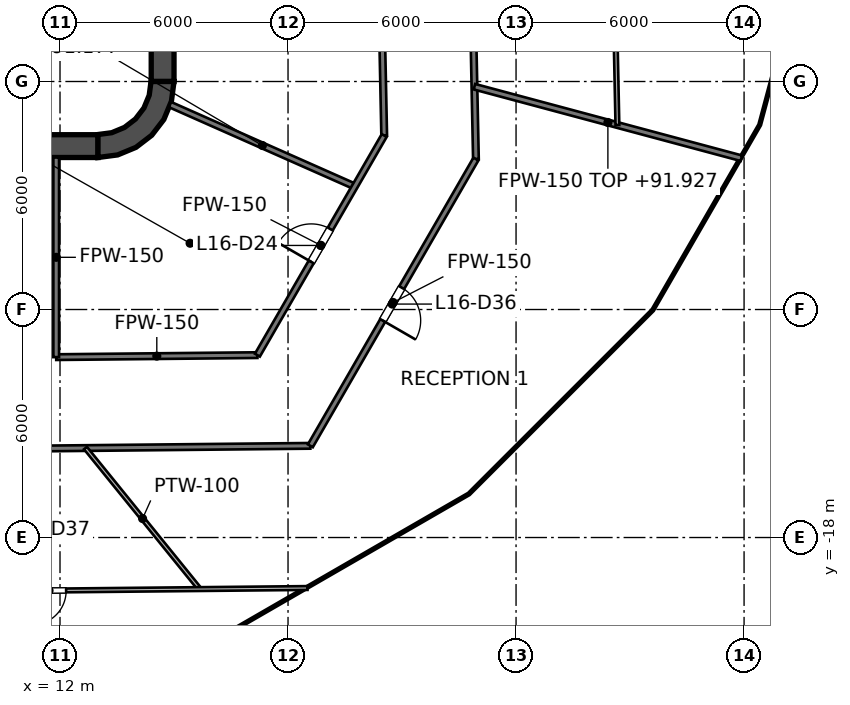
"""IFC4 building model, lengths in metres.
Left out: names, types, materials, properties, quantities, classifications, styles, units other than length and angle.
Written with IfcOpenShell. Run it as: python <this file> out.ifc"""

import sys

from ifc_helpers import new_model, si_unit, direction, frame, frame_2d, origin, place, context, subcontext, project, spatial, polyline, rectangle, outline, extrude, element, fill, save


model = new_model("IFC4")
c1 = context("Model", 3, precision=1e-05, world=origin(), true_north=direction((0.0, 1.0)))
c2 = subcontext(c1, "Body", "Model", "MODEL_VIEW")
j1 = project(units=[si_unit("LENGTHUNIT", "METRE"), si_unit("PLANEANGLEUNIT", "RADIAN")], contexts=[c1])
p1 = place(None, origin())
s1 = spatial("IfcSite", under=j1, at=p1, CompositionType="ELEMENT")
p2 = place(p1, origin())
s2 = spatial("IfcBuilding", under=s1, at=p2, CompositionType="ELEMENT")
p3 = place(p2, frame((0.0, 0.0, 88.2)))
s3 = spatial("IfcBuildingStorey", under=s2, at=p3, CompositionType="ELEMENT", Elevation=88.2)
p4 = place(p3, frame((-13.0, -7.7, 0.0), z_axis=(0.0, 0.0, 1.0), x_axis=(1.0, 0.0, 0.0)))
e1 = element("IfcWall", 1, at=p4, inside=s3, PredefinedType="SHEAR", context=c2, shape_type="SweptSolid", body=[
    extrude(rectangle(XDim=26.0, YDim=0.6, at=frame_2d((13.0, 0.0))), origin(), (0.0, 0.0, 1.0), 4.2),
])
p5 = place(p4, frame((1.7, 0.0, 0.0)))
e2 = element("IfcOpeningElement", 2, at=p5, cuts=e1, PredefinedType="OPENING", context=c2, shape_type="SweptSolid", body=[
    extrude(rectangle(XDim=1.8, YDim=2.1, at=frame_2d((0.9, 1.05))), frame((0.0, 0.3, 0.0), z_axis=(0.0, -1.0, 0.0), x_axis=(1.0, 0.0, 0.0)), (0.0, 0.0, 1.0), 0.6),
])
p6 = place(p4, frame((22.5, 0.0, 0.0)))
e3 = element("IfcOpeningElement", 3, at=p6, cuts=e1, PredefinedType="OPENING", context=c2, shape_type="SweptSolid", body=[
    extrude(rectangle(XDim=1.8, YDim=2.1, at=frame_2d((0.9, 1.05))), frame((0.0, 0.3, 0.0), z_axis=(0.0, -1.0, 0.0), x_axis=(1.0, 0.0, 0.0)), (0.0, 0.0, 1.0), 0.6),
])
p7 = place(p3, frame((14.7, -6.0, 0.0), z_axis=(0.0, 0.0, 1.0), x_axis=(0.0, 1.0, 0.0)))
e4 = element("IfcWall", 4, at=p7, inside=s3, PredefinedType="SHEAR", context=c2, shape_type="SweptSolid", body=[
    extrude(rectangle(XDim=12.0, YDim=0.6, at=frame_2d((6.0, 0.0))), origin(), (0.0, 0.0, 1.0), 4.2),
])
p8 = place(p3, origin())
e5 = element("IfcWall", 5, at=p8, inside=s3, PredefinedType="SHEAR", context=c2, shape_type="SweptSolid", body=[
    extrude(outline(polyline([(15.0, -6.0), (14.395, -6.0), (14.347, -6.361), (14.208, -6.698), (13.986, -6.986), (13.698, -7.208), (13.361, -7.347), (13.0, -7.395), (13.0, -8.0), (13.518, -7.932), (14.0, -7.732), (14.414, -7.414), (14.732, -7.0), (14.932, -6.518), (15.0, -6.0)])), origin(), (0.0, 0.0, 1.0), 4.2),
])
p9 = place(p3, frame((11.8, -7.4, 0.0), z_axis=(0.0, 0.0, 1.0), x_axis=(0.0, 1.0, 0.0)))
e6 = element("IfcWall", 6, at=p9, inside=s3, PredefinedType="SOLIDWALL", context=c2, shape_type="SweptSolid", body=[
    extrude(rectangle(XDim=14.8, YDim=0.4, at=frame_2d((7.4, 0.0))), origin(), (0.0, 0.0, 1.0), 4.05),
])
p10 = place(p9, frame((11.2, 0.0, 0.0)))
e7 = element("IfcOpeningElement", 7, at=p10, cuts=e6, PredefinedType="OPENING", context=c2, shape_type="SweptSolid", body=[
    extrude(rectangle(XDim=1.1, YDim=2.1, at=frame_2d((0.55, 1.05))), frame((0.0, 0.2, 0.0), z_axis=(0.0, -1.0, 0.0), x_axis=(1.0, 0.0, 0.0)), (0.0, 0.0, 1.0), 0.4),
])
p11 = place(p9, frame((8.3, 0.0, 0.0)))
e8 = element("IfcOpeningElement", 8, at=p11, cuts=e6, PredefinedType="OPENING", context=c2, shape_type="SweptSolid", body=[
    extrude(rectangle(XDim=1.1, YDim=2.1, at=frame_2d((0.55, 1.05))), frame((0.0, 0.2, 0.0), z_axis=(0.0, -1.0, 0.0), x_axis=(1.0, 0.0, 0.0)), (0.0, 0.0, 1.0), 0.4),
])
p12 = place(p9, frame((5.4, 0.0, 0.0)))
e9 = element("IfcOpeningElement", 9, at=p12, cuts=e6, PredefinedType="OPENING", context=c2, shape_type="SweptSolid", body=[
    extrude(rectangle(XDim=1.1, YDim=2.1, at=frame_2d((0.55, 1.05))), frame((0.0, 0.2, 0.0), z_axis=(0.0, -1.0, 0.0), x_axis=(1.0, 0.0, 0.0)), (0.0, 0.0, 1.0), 0.4),
])
p13 = place(p9, frame((13.552, 0.0, 0.0)))
e10 = element("IfcOpeningElement", 10, at=p13, cuts=e6, PredefinedType="OPENING", context=c2, shape_type="SweptSolid", body=[
    extrude(rectangle(XDim=0.9, YDim=2.1, at=frame_2d((0.45, 1.05))), frame((0.0, 0.2, 0.0), z_axis=(0.0, -1.0, 0.0), x_axis=(1.0, 0.0, 0.0)), (0.0, 0.0, 1.0), 0.4),
])
p14 = place(p9, frame((0.347, 0.0, 0.0)))
e11 = element("IfcOpeningElement", 11, at=p14, cuts=e6, PredefinedType="OPENING", context=c2, shape_type="SweptSolid", body=[
    extrude(rectangle(XDim=0.9, YDim=2.1, at=frame_2d((0.45, 1.05))), frame((0.0, 0.2, 0.0), z_axis=(0.0, -1.0, 0.0), x_axis=(1.0, 0.0, 0.0)), (0.0, 0.0, 1.0), 0.4),
])
e12 = element("IfcWall", 12, at=p8, inside=s3, PredefinedType="SOLIDWALL", context=c2, shape_type="SweptSolid", body=[
    extrude(outline(polyline([(12.0, -5.675), (12.0, -5.925), (14.15, -5.925), (14.4, -5.925), (14.4, -5.675), (14.4, -3.025), (14.4, -2.775), (14.4, -0.125), (14.4, 0.125), (14.4, 2.775), (14.4, 3.025), (14.4, 5.675), (14.4, 5.925), (14.15, 5.925), (12.0, 5.925), (12.0, 5.675), (14.15, 5.675), (14.15, 3.025), (12.0, 3.025), (12.0, 2.775), (14.15, 2.775), (14.15, 0.125), (12.0, 0.125), (12.0, -0.125), (14.15, -0.125), (14.15, -2.775), (12.0, -2.775), (12.0, -3.025), (14.15, -3.025), (14.15, -5.675), (12.0, -5.675)])), origin(), (0.0, 0.0, 1.0), 4.05),
])
p15 = place(p3, frame((20.167, 10.213, 0.0), z_axis=(0.0, 0.0, 1.0), x_axis=(0.020610894613, -0.999787572949, 0.0)))
e13 = element("IfcWall", 13, at=p15, inside=s3, PredefinedType="PARTITIONING", context=c2, shape_type="SweptSolid", body=[
    extrude(rectangle(XDim=17.637, YDim=0.15, at=frame_2d((8.819, 0.0))), origin(), (0.0, 0.0, 1.0), 2.968),
])
p16 = place(p15, frame((10.508, 0.0, 0.0)))
e14 = element("IfcOpeningElement", 14, at=p16, cuts=e13, PredefinedType="OPENING", context=c2, shape_type="SweptSolid", body=[
    extrude(rectangle(XDim=1.0, YDim=2.1, at=frame_2d((0.5, 1.05))), frame((0.0, 0.075, 0.0), z_axis=(0.0, -1.0, 0.0), x_axis=(1.0, 0.0, 0.0)), (0.0, 0.0, 1.0), 0.15),
])
p17 = place(p15, frame((5.09, 0.0, 0.0)))
e15 = element("IfcOpeningElement", 15, at=p17, cuts=e13, PredefinedType="OPENING", context=c2, shape_type="SweptSolid", body=[
    extrude(rectangle(XDim=1.0, YDim=2.1, at=frame_2d((0.5, 1.05))), frame((0.0, 0.075, 0.0), z_axis=(0.0, -1.0, 0.0), x_axis=(1.0, 0.0, 0.0)), (0.0, 0.0, 1.0), 0.15),
])
p18 = place(p3, frame((22.539, 11.615, 0.0), z_axis=(0.0, 0.0, 1.0), x_axis=(0.020601506683, -0.99978776644, 0.0)))
e16 = element("IfcWall", 16, at=p18, inside=s3, PredefinedType="PARTITIONING", context=c2, shape_type="SweptSolid", body=[
    extrude(rectangle(XDim=19.66, YDim=0.15, at=frame_2d((9.83, 0.0))), origin(), (0.0, 0.0, 1.0), 2.968),
])
p19 = place(p18, frame((13.54, 0.0, 0.0)))
e17 = element("IfcOpeningElement", 17, at=p19, cuts=e16, PredefinedType="OPENING", context=c2, shape_type="SweptSolid", body=[
    extrude(rectangle(XDim=1.0, YDim=2.1, at=frame_2d((0.5, 1.05))), frame((0.0, 0.075, 0.0), z_axis=(0.0, -1.0, 0.0), x_axis=(1.0, 0.0, 0.0)), (0.0, 0.0, 1.0), 0.15),
])
p20 = place(p18, frame((9.23, 0.0, 0.0)))
e18 = element("IfcOpeningElement", 18, at=p20, cuts=e16, PredefinedType="OPENING", context=c2, shape_type="SweptSolid", body=[
    extrude(rectangle(XDim=1.0, YDim=2.1, at=frame_2d((0.5, 1.05))), frame((0.0, 0.075, 0.0), z_axis=(0.0, -1.0, 0.0), x_axis=(1.0, 0.0, 0.0)), (0.0, 0.0, 1.0), 0.15),
])
p21 = place(p3, frame((14.895, -6.607, 0.0), z_axis=(0.0, 0.0, 1.0), x_axis=(0.914233271379, -0.405188259337, 0.0)))
e19 = element("IfcWall", 19, at=p21, inside=s3, PredefinedType="PARTITIONING", context=c2, shape_type="SweptSolid", body=[
    extrude(rectangle(XDim=5.317, YDim=0.15, at=frame_2d((2.659, 0.0))), origin(), (0.0, 0.0, 1.0), 2.977),
])
p22 = place(p3, frame((22.905, -6.137, 0.0), z_axis=(0.0, 0.0, 1.0), x_axis=(0.965915974273, -0.258855810529, 0.0)))
e20 = element("IfcWall", 20, at=p22, inside=s3, PredefinedType="PARTITIONING", context=c2, shape_type="SweptSolid", body=[
    extrude(rectangle(XDim=7.271, YDim=0.15, at=frame_2d((3.635, 0.0))), origin(), (0.0, 0.0, 1.0), 3.727),
])
p23 = place(p3, frame((-14.534, -15.916, 0.0), z_axis=(0.0, 0.0, 1.0), x_axis=(0.999950930262, 0.009906415532, 0.0)))
e21 = element("IfcWall", 21, at=p23, inside=s3, PredefinedType="PARTITIONING", context=c2, shape_type="SweptSolid", body=[
    extrude(rectangle(XDim=33.123, YDim=0.15, at=frame_2d((16.561, 0.0))), origin(), (0.0, 0.0, 1.0), 2.968),
])
p24 = place(p23, frame((22.477, 0.0, 0.0)))
e22 = element("IfcOpeningElement", 22, at=p24, cuts=e21, PredefinedType="OPENING", context=c2, shape_type="SweptSolid", body=[
    extrude(rectangle(XDim=1.0, YDim=2.1, at=frame_2d((0.5, 1.05))), frame((0.0, 0.075, 0.0), z_axis=(0.0, -1.0, 0.0), x_axis=(1.0, 0.0, 0.0)), (0.0, 0.0, 1.0), 0.15),
])
p25 = place(p23, frame((7.723, 0.0, 0.0)))
e23 = element("IfcOpeningElement", 23, at=p25, cuts=e21, PredefinedType="OPENING", context=c2, shape_type="SweptSolid", body=[
    extrude(rectangle(XDim=1.0, YDim=2.1, at=frame_2d((0.5, 1.05))), frame((0.0, 0.075, 0.0), z_axis=(0.0, -1.0, 0.0), x_axis=(1.0, 0.0, 0.0)), (0.0, 0.0, 1.0), 0.15),
])
p26 = place(p23, frame((16.111, 0.0, 0.0)))
e24 = element("IfcOpeningElement", 24, at=p26, cuts=e21, PredefinedType="OPENING", context=c2, shape_type="SweptSolid", body=[
    extrude(rectangle(XDim=1.0, YDim=2.1, at=frame_2d((0.5, 1.05))), frame((0.0, 0.075, 0.0), z_axis=(0.0, -1.0, 0.0), x_axis=(1.0, 0.0, 0.0)), (0.0, 0.0, 1.0), 0.15),
])
p27 = place(p3, frame((11.9, -13.253, 0.0), z_axis=(0.0, 0.0, 1.0), x_axis=(0.999950853109, 0.009914200296, 0.0)))
e25 = element("IfcWall", 25, at=p27, inside=s3, PredefinedType="PARTITIONING", context=c2, shape_type="SweptSolid", body=[
    extrude(rectangle(XDim=5.294, YDim=0.15, at=frame_2d((2.647, 0.0))), origin(), (0.0, 0.0, 1.0), 2.968),
])
p28 = place(p3, frame((18.587, -15.587, 0.0), z_axis=(0.0, 0.0, 1.0), x_axis=(0.500026433136, 0.866010142069, 0.0)))
e26 = element("IfcWall", 26, at=p28, inside=s3, PredefinedType="PARTITIONING", context=c2, shape_type="SweptSolid", body=[
    extrude(rectangle(XDim=8.713, YDim=0.15, at=frame_2d((4.357, 0.0))), origin(), (0.0, 0.0, 1.0), 2.968),
])
p29 = place(p28, frame((3.807, 0.0, 0.0)))
e27 = element("IfcOpeningElement", 27, at=p29, cuts=e26, PredefinedType="OPENING", context=c2, shape_type="SweptSolid", body=[
    extrude(rectangle(XDim=1.0, YDim=2.1, at=frame_2d((0.5, 1.05))), frame((0.0, 0.075, 0.0), z_axis=(0.0, -1.0, 0.0), x_axis=(1.0, 0.0, 0.0)), (0.0, 0.0, 1.0), 0.15),
])
p30 = place(p3, frame((17.194, -13.201, 0.0), z_axis=(0.0, 0.0, 1.0), x_axis=(0.50001062018, 0.866019272134, 0.0)))
e28 = element("IfcWall", 28, at=p30, inside=s3, PredefinedType="PARTITIONING", context=c2, shape_type="SweptSolid", body=[
    extrude(rectangle(XDim=6.674, YDim=0.15, at=frame_2d((3.337, 0.0))), origin(), (0.0, 0.0, 1.0), 2.968),
])
p31 = place(p30, frame((2.833, 0.0, 0.0)))
e29 = element("IfcOpeningElement", 29, at=p31, cuts=e28, PredefinedType="OPENING", context=c2, shape_type="SweptSolid", body=[
    extrude(rectangle(XDim=1.0, YDim=2.1, at=frame_2d((0.5, 1.05))), frame((0.0, 0.075, 0.0), z_axis=(0.0, -1.0, 0.0), x_axis=(1.0, 0.0, 0.0)), (0.0, 0.0, 1.0), 0.15),
])
p32 = place(p3, frame((11.9, -13.253, 0.0), z_axis=(0.0, 0.0, 1.0), x_axis=(0.0, 1.0, 0.0)))
e30 = element("IfcWall", 30, at=p32, inside=s3, PredefinedType="PARTITIONING", context=c2, shape_type="SweptSolid", body=[
    extrude(rectangle(XDim=5.253, YDim=0.15, at=frame_2d((2.626, 0.0))), origin(), (0.0, 0.0, 1.0), 2.968),
])
p33 = place(p3, frame((26.243, 13.397, 0.0), z_axis=(0.0, 0.0, 1.0), x_axis=(0.020639766813, -0.999786977324, 0.0)))
e31 = element("IfcWall", 31, at=p33, inside=s3, PredefinedType="PARTITIONING", context=c2, shape_type="SweptSolid", body=[
    extrude(rectangle(XDim=20.546, YDim=0.1, at=frame_2d((10.273, 0.0))), origin(), (0.0, 0.0, 1.0), 2.968),
])
p34 = place(p33, frame((5.506, 0.0, 0.0)))
e32 = element("IfcOpeningElement", 32, at=p34, cuts=e31, PredefinedType="OPENING", context=c2, shape_type="SweptSolid", body=[
    extrude(rectangle(XDim=0.9, YDim=2.1, at=frame_2d((0.45, 1.05))), frame((0.0, 0.05, 0.0), z_axis=(0.0, -1.0, 0.0), x_axis=(1.0, 0.0, 0.0)), (0.0, 0.0, 1.0), 0.1),
])
p35 = place(p3, frame((12.67, -15.646, 0.0), z_axis=(0.0, 0.0, 1.0), x_axis=(0.629429152062, -0.777057875923, 0.0)))
e33 = element("IfcWall", 33, at=p35, inside=s3, PredefinedType="PARTITIONING", context=c2, shape_type="SweptSolid", body=[
    extrude(rectangle(XDim=4.774, YDim=0.1, at=frame_2d((2.387, 0.0))), origin(), (0.0, 0.0, 1.0), 3.9),
])
p36 = place(p3, frame((-15.26, -19.663, 0.0), z_axis=(0.0, 0.0, 1.0), x_axis=(0.999951032014, 0.009896139397, 0.0)))
e34 = element("IfcWall", 34, at=p36, inside=s3, PredefinedType="PARTITIONING", context=c2, shape_type="SweptSolid", body=[
    extrude(rectangle(XDim=33.774, YDim=0.1, at=frame_2d((16.887, 0.0))), origin(), (0.0, 0.0, 1.0), 2.968),
])
p37 = place(p36, frame((26.523, 0.0, 0.0)))
e35 = element("IfcOpeningElement", 35, at=p37, cuts=e34, PredefinedType="OPENING", context=c2, shape_type="SweptSolid", body=[
    extrude(rectangle(XDim=0.9, YDim=2.1, at=frame_2d((0.45, 1.05))), frame((0.0, 0.05, 0.0), z_axis=(0.0, -1.0, 0.0), x_axis=(1.0, 0.0, 0.0)), (0.0, 0.0, 1.0), 0.1),
])
p38 = place(p36, frame((2.43, 0.0, 0.0)))
e36 = element("IfcOpeningElement", 36, at=p38, cuts=e34, PredefinedType="OPENING", context=c2, shape_type="SweptSolid", body=[
    extrude(rectangle(XDim=0.9, YDim=2.1, at=frame_2d((0.45, 1.05))), frame((0.0, 0.05, 0.0), z_axis=(0.0, -1.0, 0.0), x_axis=(1.0, 0.0, 0.0)), (0.0, 0.0, 1.0), 0.1),
])
p39 = place(p36, frame((15.34, 0.0, 0.0)))
e37 = element("IfcOpeningElement", 37, at=p39, cuts=e34, PredefinedType="OPENING", context=c2, shape_type="SweptSolid", body=[
    extrude(rectangle(XDim=0.9, YDim=2.1, at=frame_2d((0.45, 1.05))), frame((0.0, 0.05, 0.0), z_axis=(0.0, -1.0, 0.0), x_axis=(1.0, 0.0, 0.0)), (0.0, 0.0, 1.0), 0.1),
])
p40 = place(p14, origin())
e38 = element("IfcDoor", 38, at=p40, inside=s3, OperationType="SINGLE_SWING_RIGHT", PredefinedType="DOOR", context=c2, shape_type="SweptSolid", body=[
    extrude(rectangle(XDim=0.9, YDim=2.1, at=frame_2d((0.45, 1.05))), frame((0.0, 0.025, 0.0), z_axis=(0.0, -1.0, 0.0), x_axis=(1.0, 0.0, 0.0)), (0.0, 0.0, 1.0), 0.05),
])
fill(e11, e38)
p41 = place(p31, origin())
e39 = element("IfcDoor", 39, at=p41, inside=s3, OperationType="SINGLE_SWING_LEFT", PredefinedType="DOOR", context=c2, shape_type="SweptSolid", body=[
    extrude(rectangle(XDim=1.0, YDim=2.1, at=frame_2d((0.5, 1.05))), frame((0.0, 0.025, 0.0), z_axis=(0.0, -1.0, 0.0), x_axis=(1.0, 0.0, 0.0)), (0.0, 0.0, 1.0), 0.05),
])
fill(e29, e39)
p42 = place(p29, origin())
e40 = element("IfcDoor", 40, at=p42, inside=s3, OperationType="SINGLE_SWING_LEFT", PredefinedType="DOOR", context=c2, shape_type="SweptSolid", body=[
    extrude(rectangle(XDim=1.0, YDim=2.1, at=frame_2d((0.5, 1.05))), frame((0.0, 0.025, 0.0), z_axis=(0.0, -1.0, 0.0), x_axis=(1.0, 0.0, 0.0)), (0.0, 0.0, 1.0), 0.05),
])
fill(e27, e40)
p43 = place(p37, origin())
e41 = element("IfcDoor", 41, at=p43, inside=s3, OperationType="SINGLE_SWING_LEFT", PredefinedType="DOOR", context=c2, shape_type="SweptSolid", body=[
    extrude(rectangle(XDim=0.9, YDim=2.1, at=frame_2d((0.45, 1.05))), frame((0.0, 0.025, 0.0), z_axis=(0.0, -1.0, 0.0), x_axis=(1.0, 0.0, 0.0)), (0.0, 0.0, 1.0), 0.05),
])
fill(e35, e41)
save(model, sys.argv[1])
